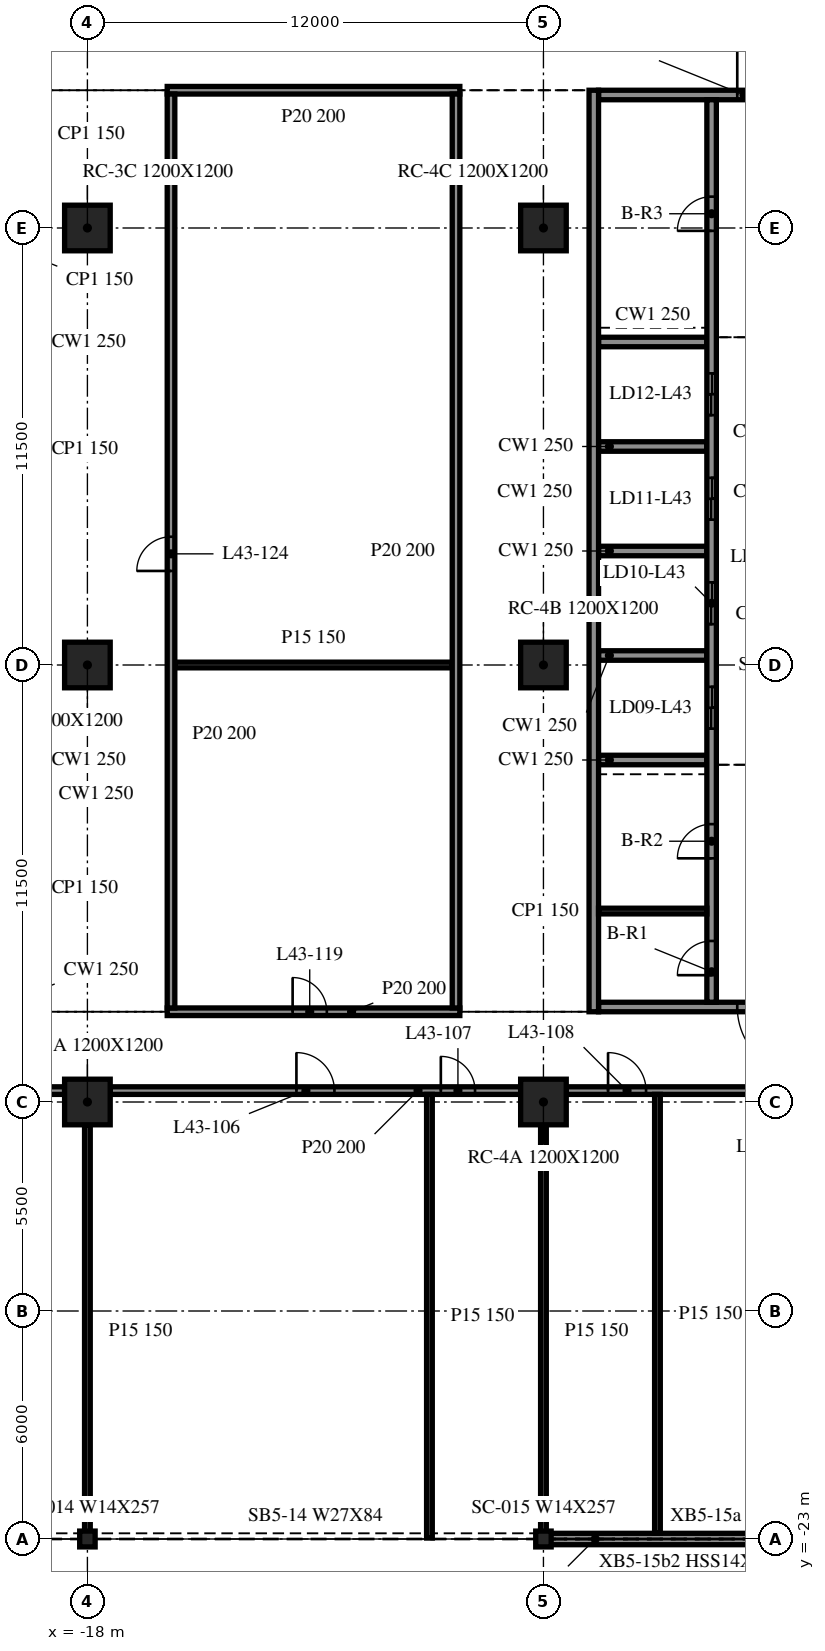
"""IFC4 building model, lengths in metres.
Left out: names, types, materials, properties, quantities, classifications, styles, units other than length and angle.
Written with IfcOpenShell. Run it as: python <this file> out.ifc"""

import sys

from ifc_helpers import new_model, si_unit, direction, frame, frame_2d, origin, origin_2d, place, context, subcontext, project, spatial, rectangle, i_section, extrude, element, fill, save


model = new_model("IFC4")
c1 = context("Model", 3, precision=1e-05, world=origin(), true_north=direction((0.0, 1.0)))
c2 = subcontext(c1, "Body", "Model", "MODEL_VIEW")
j1 = project(units=[si_unit("LENGTHUNIT", "METRE"), si_unit("PLANEANGLEUNIT", "RADIAN")], contexts=[c1])
p1 = place(None, origin())
s1 = spatial("IfcSite", under=j1, at=p1, CompositionType="ELEMENT")
p2 = place(p1, origin())
s2 = spatial("IfcBuilding", under=s1, at=p2, CompositionType="ELEMENT")
p3 = place(p2, frame((0.0, 0.0, 182.0)))
s3 = spatial("IfcBuildingStorey", under=s2, at=p3, CompositionType="ELEMENT", Elevation=182.0)
for number, where, z_axis, x_axis in (
    (1, (-18.0, -11.5, -0.34), (0.0, 0.0, 1.0), (1.0, 0.0, 0.0)),
    (2, (-18.0, 0.0, -0.34), (0.0, 0.0, 1.0), (1.0, 0.0, 0.0)),
    (3, (-18.0, 11.5, -0.34), (0.0, 0.0, 1.0), (1.0, 0.0, 0.0)),
    (4, (-6.0, -11.5, -0.34), (0.0, 0.0, 1.0), (1.0, 0.0, 0.0)),
    (5, (-6.0, 0.0, -0.34), (0.0, 0.0, 1.0), (1.0, 0.0, 0.0)),
    (6, (-6.0, 11.5, -0.34), (0.0, 0.0, 1.0), (1.0, 0.0, 0.0)),
):
    element("IfcColumn", number, at=place(p3, frame(where, z_axis=z_axis, x_axis=x_axis)), inside=s3, PredefinedType="COLUMN", context=c2, shape_type="SweptSolid", body=[
        extrude(rectangle(XDim=1.2, YDim=1.2, at=origin_2d()), origin(), (0.0, 0.0, 1.0), 3.8),
    ])
for number, where, z_axis, x_axis in (
    (7, (-18.0, -23.0, -0.34), (0.0, 0.0, 1.0), (1.0, 0.0, 0.0)),
    (8, (-6.0, -23.0, -0.34), (0.0, 0.0, 1.0), (1.0, 0.0, 0.0)),
):
    element("IfcColumn", number, at=place(p3, frame(where, z_axis=z_axis, x_axis=x_axis)), inside=s3, PredefinedType="COLUMN", context=c2, shape_type="SweptSolid", body=[
        extrude(i_section(OverallWidth=0.406, OverallDepth=0.417, WebThickness=0.03, FlangeThickness=0.048, at=origin_2d()), origin(), (0.0, 0.0, 1.0), 3.8),
    ])
p4 = place(p3, frame((-5.985, -23.0, 0.0), z_axis=(0.0, 0.0, 1.0), x_axis=(1.0, 0.0, 0.0)))
e9 = element("IfcWall", 9, at=p4, inside=s3, PredefinedType="NOTDEFINED", context=c2, shape_type="SweptSolid", body=[
    extrude(rectangle(XDim=11.97, YDim=0.3, at=frame_2d((5.985, 0.0))), origin(), (0.0, 0.0, 1.0), 2.782),
])
p5 = place(p3, frame((-4.675, 15.125, 0.0), z_axis=(0.0, 0.0, 1.0), x_axis=(0.0, -1.0, 0.0)))
e10 = element("IfcWall", 10, at=p5, inside=s3, PredefinedType="SOLIDWALL", context=c2, shape_type="SweptSolid", body=[
    extrude(rectangle(XDim=24.25, YDim=0.25, at=frame_2d((12.125, 0.0))), origin(), (0.0, 0.0, 1.0), 3.46),
])
p6 = place(p3, frame((4.55, -9.0, 0.0), z_axis=(0.0, 0.0, 1.0), x_axis=(-1.0, 0.0, 0.0)))
e11 = element("IfcWall", 11, at=p6, inside=s3, PredefinedType="SOLIDWALL", context=c2, shape_type="SweptSolid", body=[
    extrude(rectangle(XDim=9.1, YDim=0.25, at=frame_2d((4.55, 0.0))), origin(), (0.0, 0.0, 1.0), 3.46),
])
p7 = place(p6, frame((3.65, 0.0, 0.0)))
e12 = element("IfcOpeningElement", 12, at=p7, cuts=e11, PredefinedType="OPENING", context=c2, shape_type="SweptSolid", body=[
    extrude(rectangle(XDim=1.8, YDim=2.1, at=frame_2d((0.9, 1.05))), frame((0.0, 0.135, 0.0), z_axis=(0.0, -1.0, 0.0), x_axis=(1.0, 0.0, 0.0)), (0.0, 0.0, 1.0), 0.27),
])
p8 = place(p3, frame((-4.55, 15.0, 0.0), z_axis=(0.0, 0.0, 1.0), x_axis=(1.0, 0.0, 0.0)))
e13 = element("IfcWall", 13, at=p8, inside=s3, PredefinedType="SOLIDWALL", context=c2, shape_type="SweptSolid", body=[
    extrude(rectangle(XDim=9.1, YDim=0.25, at=frame_2d((4.55, 0.0))), origin(), (0.0, 0.0, 1.0), 3.46),
])
p9 = place(p8, frame((3.65, 0.0, 0.0)))
e14 = element("IfcOpeningElement", 14, at=p9, cuts=e13, PredefinedType="OPENING", context=c2, shape_type="SweptSolid", body=[
    extrude(rectangle(XDim=1.8, YDim=2.1, at=frame_2d((0.9, 1.05))), frame((0.0, 0.135, 0.0), z_axis=(0.0, -1.0, 0.0), x_axis=(1.0, 0.0, 0.0)), (0.0, 0.0, 1.0), 0.27),
])
p10 = place(p3, frame((-1.575, -8.875, 0.0), z_axis=(0.0, 0.0, 1.0), x_axis=(0.0, 1.0, 0.0)))
e15 = element("IfcWall", 15, at=p10, inside=s3, PredefinedType="SOLIDWALL", context=c2, shape_type="SweptSolid", body=[
    extrude(rectangle(XDim=23.75, YDim=0.25, at=frame_2d((11.875, 0.0))), origin(), (0.0, 0.0, 1.0), 3.46),
])
p11 = place(p10, frame((7.2, 0.0, 0.0)))
e16 = element("IfcOpeningElement", 16, at=p11, cuts=e15, PredefinedType="OPENING", context=c2, shape_type="SweptSolid", body=[
    extrude(rectangle(XDim=1.1, YDim=2.1, at=frame_2d((0.55, 1.05))), frame((0.0, 0.135, 0.0), z_axis=(0.0, -1.0, 0.0), x_axis=(1.0, 0.0, 0.0)), (0.0, 0.0, 1.0), 0.27),
])
p12 = place(p10, frame((9.95, 0.0, 0.0)))
e17 = element("IfcOpeningElement", 17, at=p12, cuts=e15, PredefinedType="OPENING", context=c2, shape_type="SweptSolid", body=[
    extrude(rectangle(XDim=1.1, YDim=2.1, at=frame_2d((0.55, 1.05))), frame((0.0, 0.135, 0.0), z_axis=(0.0, -1.0, 0.0), x_axis=(1.0, 0.0, 0.0)), (0.0, 0.0, 1.0), 0.27),
])
p13 = place(p10, frame((12.7, 0.0, 0.0)))
e18 = element("IfcOpeningElement", 18, at=p13, cuts=e15, PredefinedType="OPENING", context=c2, shape_type="SweptSolid", body=[
    extrude(rectangle(XDim=1.1, YDim=2.1, at=frame_2d((0.55, 1.05))), frame((0.0, 0.135, 0.0), z_axis=(0.0, -1.0, 0.0), x_axis=(1.0, 0.0, 0.0)), (0.0, 0.0, 1.0), 0.27),
])
p14 = place(p10, frame((15.45, 0.0, 0.0)))
e19 = element("IfcOpeningElement", 19, at=p14, cuts=e15, PredefinedType="OPENING", context=c2, shape_type="SweptSolid", body=[
    extrude(rectangle(XDim=1.1, YDim=2.1, at=frame_2d((0.55, 1.05))), frame((0.0, 0.135, 0.0), z_axis=(0.0, -1.0, 0.0), x_axis=(1.0, 0.0, 0.0)), (0.0, 0.0, 1.0), 0.27),
])
p15 = place(p10, frame((0.712, 0.0, 0.0)))
e20 = element("IfcOpeningElement", 20, at=p15, cuts=e15, PredefinedType="OPENING", context=c2, shape_type="SweptSolid", body=[
    extrude(rectangle(XDim=0.9, YDim=2.1, at=frame_2d((0.45, 1.05))), frame((0.0, 0.135, 0.0), z_axis=(0.0, -1.0, 0.0), x_axis=(1.0, 0.0, 0.0)), (0.0, 0.0, 1.0), 0.27),
])
p16 = place(p10, frame((3.788, 0.0, 0.0)))
e21 = element("IfcOpeningElement", 21, at=p16, cuts=e15, PredefinedType="OPENING", context=c2, shape_type="SweptSolid", body=[
    extrude(rectangle(XDim=0.9, YDim=2.1, at=frame_2d((0.45, 1.05))), frame((0.0, 0.135, 0.0), z_axis=(0.0, -1.0, 0.0), x_axis=(1.0, 0.0, 0.0)), (0.0, 0.0, 1.0), 0.27),
])
p17 = place(p10, frame((20.3, 0.0, 0.0)))
e22 = element("IfcOpeningElement", 22, at=p17, cuts=e15, PredefinedType="OPENING", context=c2, shape_type="SweptSolid", body=[
    extrude(rectangle(XDim=0.9, YDim=2.1, at=frame_2d((0.45, 1.05))), frame((0.0, 0.135, 0.0), z_axis=(0.0, -1.0, 0.0), x_axis=(1.0, 0.0, 0.0)), (0.0, 0.0, 1.0), 0.27),
])
for number, where, z_axis, x_axis in (
    (23, (-4.55, -2.5, 0.0), (0.0, 0.0, 1.0), (1.0, 0.0, 0.0)),
    (24, (-4.55, 0.25, 0.0), (0.0, 0.0, 1.0), (1.0, 0.0, 0.0)),
    (25, (-4.55, 3.0, 0.0), (0.0, 0.0, 1.0), (1.0, 0.0, 0.0)),
    (26, (-4.55, 5.75, 0.0), (0.0, 0.0, 1.0), (1.0, 0.0, 0.0)),
    (27, (-4.55, 8.5, 0.0), (0.0, 0.0, 1.0), (1.0, 0.0, 0.0)),
):
    element("IfcWall", number, at=place(p3, frame(where, z_axis=z_axis, x_axis=x_axis)), inside=s3, PredefinedType="SOLIDWALL", context=c2, shape_type="SweptSolid", body=[
        extrude(rectangle(XDim=2.85, YDim=0.25, at=frame_2d((1.425, 0.0))), origin(), (0.0, 0.0, 1.0), 3.46),
    ])
p18 = place(p3, frame((-4.55, -6.475, 0.0), z_axis=(0.0, 0.0, 1.0), x_axis=(1.0, 0.0, 0.0)))
e28 = element("IfcWall", 28, at=p18, inside=s3, PredefinedType="PARTITIONING", context=c2, shape_type="SweptSolid", body=[
    extrude(rectangle(XDim=2.85, YDim=0.15, at=frame_2d((1.425, 0.0))), origin(), (0.0, 0.0, 1.0), 3.46),
])
p19 = place(p3, frame((-29.4, -11.2, 0.0), z_axis=(0.0, 0.0, 1.0), x_axis=(1.0, 0.0, 0.0)))
e29 = element("IfcWall", 29, at=p19, inside=s3, PredefinedType="PARTITIONING", context=c2, shape_type="SweptSolid", body=[
    extrude(rectangle(XDim=10.8, YDim=0.2, at=frame_2d((5.4, 0.0))), origin(), (0.0, 0.0, 1.0), 3.46),
])
p20 = place(p19, frame((4.1, 0.0, 0.0)))
e30 = element("IfcOpeningElement", 30, at=p20, cuts=e29, PredefinedType="OPENING", context=c2, shape_type="SweptSolid", body=[
    extrude(rectangle(XDim=1.0, YDim=2.1, at=frame_2d((0.5, 1.05))), frame((0.0, 0.11, 0.0), z_axis=(0.0, -1.0, 0.0), x_axis=(1.0, 0.0, 0.0)), (0.0, 0.0, 1.0), 0.22),
])
p21 = place(p19, frame((5.7, 0.0, 0.0)))
e31 = element("IfcOpeningElement", 31, at=p21, cuts=e29, PredefinedType="OPENING", context=c2, shape_type="SweptSolid", body=[
    extrude(rectangle(XDim=1.0, YDim=2.1, at=frame_2d((0.5, 1.05))), frame((0.0, 0.11, 0.0), z_axis=(0.0, -1.0, 0.0), x_axis=(1.0, 0.0, 0.0)), (0.0, 0.0, 1.0), 0.22),
])
p22 = place(p3, frame((-17.4, -11.2, 0.0), z_axis=(0.0, 0.0, 1.0), x_axis=(1.0, 0.0, 0.0)))
e32 = element("IfcWall", 32, at=p22, inside=s3, PredefinedType="PARTITIONING", context=c2, shape_type="SweptSolid", body=[
    extrude(rectangle(XDim=10.8, YDim=0.2, at=frame_2d((5.4, 0.0))), origin(), (0.0, 0.0, 1.0), 3.46),
])
p23 = place(p22, frame((4.9, 0.0, 0.0)))
e33 = element("IfcOpeningElement", 33, at=p23, cuts=e32, PredefinedType="OPENING", context=c2, shape_type="SweptSolid", body=[
    extrude(rectangle(XDim=1.0, YDim=2.1, at=frame_2d((0.5, 1.05))), frame((0.0, 0.11, 0.0), z_axis=(0.0, -1.0, 0.0), x_axis=(1.0, 0.0, 0.0)), (0.0, 0.0, 1.0), 0.22),
])
p24 = place(p22, frame((8.7, 0.0, 0.0)))
e34 = element("IfcOpeningElement", 34, at=p24, cuts=e32, PredefinedType="OPENING", context=c2, shape_type="SweptSolid", body=[
    extrude(rectangle(XDim=0.9, YDim=2.1, at=frame_2d((0.45, 1.05))), frame((0.0, 0.11, 0.0), z_axis=(0.0, -1.0, 0.0), x_axis=(1.0, 0.0, 0.0)), (0.0, 0.0, 1.0), 0.22),
])
p25 = place(p3, frame((-5.4, -11.2, 0.0), z_axis=(0.0, 0.0, 1.0), x_axis=(1.0, 0.0, 0.0)))
e35 = element("IfcWall", 35, at=p25, inside=s3, PredefinedType="PARTITIONING", context=c2, shape_type="SweptSolid", body=[
    extrude(rectangle(XDim=10.8, YDim=0.2, at=frame_2d((5.4, 0.0))), origin(), (0.0, 0.0, 1.0), 3.46),
])
p26 = place(p25, frame((1.1, 0.0, 0.0)))
e36 = element("IfcOpeningElement", 36, at=p26, cuts=e35, PredefinedType="OPENING", context=c2, shape_type="SweptSolid", body=[
    extrude(rectangle(XDim=1.0, YDim=2.1, at=frame_2d((0.5, 1.05))), frame((0.0, 0.11, 0.0), z_axis=(0.0, -1.0, 0.0), x_axis=(1.0, 0.0, 0.0)), (0.0, 0.0, 1.0), 0.22),
])
p27 = place(p25, frame((4.9, 0.0, 0.0)))
e37 = element("IfcOpeningElement", 37, at=p27, cuts=e35, PredefinedType="OPENING", context=c2, shape_type="SweptSolid", body=[
    extrude(rectangle(XDim=0.9, YDim=2.1, at=frame_2d((0.45, 1.05))), frame((0.0, 0.11, 0.0), z_axis=(0.0, -1.0, 0.0), x_axis=(1.0, 0.0, 0.0)), (0.0, 0.0, 1.0), 0.22),
])
p28 = place(p3, frame((-15.9, -9.125, 0.0), z_axis=(0.0, 0.0, 1.0), x_axis=(1.0, 0.0, 0.0)))
e38 = element("IfcWall", 38, at=p28, inside=s3, PredefinedType="PARTITIONING", context=c2, shape_type="SweptSolid", body=[
    extrude(rectangle(XDim=7.7, YDim=0.2, at=frame_2d((3.85, 0.0))), origin(), (0.0, 0.0, 1.0), 3.46),
])
p29 = place(p28, frame((3.3, 0.0, 0.0)))
e39 = element("IfcOpeningElement", 39, at=p29, cuts=e38, PredefinedType="OPENING", context=c2, shape_type="SweptSolid", body=[
    extrude(rectangle(XDim=0.9, YDim=2.1, at=frame_2d((0.45, 1.05))), frame((0.0, 0.11, 0.0), z_axis=(0.0, -1.0, 0.0), x_axis=(1.0, 0.0, 0.0)), (0.0, 0.0, 1.0), 0.22),
])
p30 = place(p3, frame((-15.7, 0.0, 0.0), z_axis=(0.0, 0.0, 1.0), x_axis=(1.0, 0.0, 0.0)))
e40 = element("IfcWall", 40, at=p30, inside=s3, PredefinedType="PARTITIONING", context=c2, shape_type="SweptSolid", body=[
    extrude(rectangle(XDim=7.3, YDim=0.15, at=frame_2d((3.65, 0.0))), origin(), (0.0, 0.0, 1.0), 3.46),
])
p31 = place(p3, frame((-15.9, 15.125, 0.0), z_axis=(0.0, 0.0, 1.0), x_axis=(1.0, 0.0, 0.0)))
e41 = element("IfcWall", 41, at=p31, inside=s3, PredefinedType="PARTITIONING", context=c2, shape_type="SweptSolid", body=[
    extrude(rectangle(XDim=7.7, YDim=0.2, at=frame_2d((3.85, 0.0))), origin(), (0.0, 0.0, 1.0), 3.46),
])
p32 = place(p3, frame((-18.0, -22.975, 0.0), z_axis=(0.0, 0.0, 1.0), x_axis=(0.0, 1.0, 0.0)))
e42 = element("IfcWall", 42, at=p32, inside=s3, PredefinedType="PARTITIONING", context=c2, shape_type="SweptSolid", body=[
    extrude(rectangle(XDim=10.875, YDim=0.15, at=frame_2d((5.438, 0.0))), origin(), (0.0, 0.0, 1.0), 3.46),
])
p33 = place(p3, frame((-15.8, -9.025, 0.0), z_axis=(0.0, 0.0, 1.0), x_axis=(0.0, 1.0, 0.0)))
e43 = element("IfcWall", 43, at=p33, inside=s3, PredefinedType="PARTITIONING", context=c2, shape_type="SweptSolid", body=[
    extrude(rectangle(XDim=24.05, YDim=0.2, at=frame_2d((12.025, 0.0))), origin(), (0.0, 0.0, 1.0), 3.46),
])
p34 = place(p33, frame((11.5, 0.0, 0.0)))
e44 = element("IfcOpeningElement", 44, at=p34, cuts=e43, PredefinedType="OPENING", context=c2, shape_type="SweptSolid", body=[
    extrude(rectangle(XDim=0.9, YDim=2.1, at=frame_2d((0.45, 1.05))), frame((0.0, 0.11, 0.0), z_axis=(0.0, -1.0, 0.0), x_axis=(1.0, 0.0, 0.0)), (0.0, 0.0, 1.0), 0.22),
])
p35 = place(p3, frame((-9.0, -22.975, 0.0), z_axis=(0.0, 0.0, 1.0), x_axis=(0.0, 1.0, 0.0)))
e45 = element("IfcWall", 45, at=p35, inside=s3, PredefinedType="PARTITIONING", context=c2, shape_type="SweptSolid", body=[
    extrude(rectangle(XDim=11.675, YDim=0.15, at=frame_2d((5.837, 0.0))), origin(), (0.0, 0.0, 1.0), 3.46),
])
p36 = place(p3, frame((-8.3, -9.025, 0.0), z_axis=(0.0, 0.0, 1.0), x_axis=(0.0, 1.0, 0.0)))
e46 = element("IfcWall", 46, at=p36, inside=s3, PredefinedType="PARTITIONING", context=c2, shape_type="SweptSolid", body=[
    extrude(rectangle(XDim=24.05, YDim=0.2, at=frame_2d((12.025, 0.0))), origin(), (0.0, 0.0, 1.0), 3.46),
])
p37 = place(p3, frame((-6.0, -22.975, 0.0), z_axis=(0.0, 0.0, 1.0), x_axis=(0.0, 1.0, 0.0)))
e47 = element("IfcWall", 47, at=p37, inside=s3, PredefinedType="PARTITIONING", context=c2, shape_type="SweptSolid", body=[
    extrude(rectangle(XDim=10.875, YDim=0.15, at=frame_2d((5.438, 0.0))), origin(), (0.0, 0.0, 1.0), 3.46),
])
p38 = place(p3, frame((-3.0, -22.85, 0.0), z_axis=(0.0, 0.0, 1.0), x_axis=(0.0, 1.0, 0.0)))
e48 = element("IfcWall", 48, at=p38, inside=s3, PredefinedType="PARTITIONING", context=c2, shape_type="SweptSolid", body=[
    extrude(rectangle(XDim=11.55, YDim=0.15, at=frame_2d((5.775, 0.0))), origin(), (0.0, 0.0, 1.0), 3.46),
])
p39 = place(p7, origin())
e49 = element("IfcDoor", 49, at=p39, inside=s3, OperationType="DOUBLE_DOOR_SINGLE_SWING", PredefinedType="DOOR", context=c2, shape_type="SweptSolid", body=[
    extrude(rectangle(XDim=1.8, YDim=2.1, at=frame_2d((0.9, 1.05))), frame((0.0, 0.025, 0.0), z_axis=(0.0, -1.0, 0.0), x_axis=(1.0, 0.0, 0.0)), (0.0, 0.0, 1.0), 0.05),
])
fill(e12, e49)
p40 = place(p9, origin())
e50 = element("IfcDoor", 50, at=p40, inside=s3, OperationType="DOUBLE_DOOR_SINGLE_SWING", PredefinedType="DOOR", context=c2, shape_type="SweptSolid", body=[
    extrude(rectangle(XDim=1.8, YDim=2.1, at=frame_2d((0.9, 1.05))), frame((0.0, 0.025, 0.0), z_axis=(0.0, -1.0, 0.0), x_axis=(1.0, 0.0, 0.0)), (0.0, 0.0, 1.0), 0.05),
])
fill(e14, e50)
p41 = place(p11, origin())
e51 = element("IfcDoor", 51, at=p41, inside=s3, OperationType="DOUBLE_DOOR_SLIDING", PredefinedType="DOOR", context=c2, shape_type="SweptSolid", body=[
    extrude(rectangle(XDim=1.1, YDim=2.1, at=frame_2d((0.55, 1.05))), frame((0.0, 0.025, 0.0), z_axis=(0.0, -1.0, 0.0), x_axis=(1.0, 0.0, 0.0)), (0.0, 0.0, 1.0), 0.05),
])
fill(e16, e51)
p42 = place(p12, origin())
e52 = element("IfcDoor", 52, at=p42, inside=s3, OperationType="DOUBLE_DOOR_SLIDING", PredefinedType="DOOR", context=c2, shape_type="SweptSolid", body=[
    extrude(rectangle(XDim=1.1, YDim=2.1, at=frame_2d((0.55, 1.05))), frame((0.0, 0.025, 0.0), z_axis=(0.0, -1.0, 0.0), x_axis=(1.0, 0.0, 0.0)), (0.0, 0.0, 1.0), 0.05),
])
fill(e17, e52)
p43 = place(p13, origin())
e53 = element("IfcDoor", 53, at=p43, inside=s3, OperationType="DOUBLE_DOOR_SLIDING", PredefinedType="DOOR", context=c2, shape_type="SweptSolid", body=[
    extrude(rectangle(XDim=1.1, YDim=2.1, at=frame_2d((0.55, 1.05))), frame((0.0, 0.025, 0.0), z_axis=(0.0, -1.0, 0.0), x_axis=(1.0, 0.0, 0.0)), (0.0, 0.0, 1.0), 0.05),
])
fill(e18, e53)
p44 = place(p14, origin())
e54 = element("IfcDoor", 54, at=p44, inside=s3, OperationType="DOUBLE_DOOR_SLIDING", PredefinedType="DOOR", context=c2, shape_type="SweptSolid", body=[
    extrude(rectangle(XDim=1.1, YDim=2.1, at=frame_2d((0.55, 1.05))), frame((0.0, 0.025, 0.0), z_axis=(0.0, -1.0, 0.0), x_axis=(1.0, 0.0, 0.0)), (0.0, 0.0, 1.0), 0.05),
])
fill(e19, e54)
p45 = place(p15, origin())
e55 = element("IfcDoor", 55, at=p45, inside=s3, OperationType="SINGLE_SWING_LEFT", PredefinedType="DOOR", context=c2, shape_type="SweptSolid", body=[
    extrude(rectangle(XDim=0.9, YDim=2.1, at=frame_2d((0.45, 1.05))), frame((0.0, 0.025, 0.0), z_axis=(0.0, -1.0, 0.0), x_axis=(1.0, 0.0, 0.0)), (0.0, 0.0, 1.0), 0.05),
])
fill(e20, e55)
p46 = place(p16, origin())
e56 = element("IfcDoor", 56, at=p46, inside=s3, OperationType="SINGLE_SWING_RIGHT", PredefinedType="DOOR", context=c2, shape_type="SweptSolid", body=[
    extrude(rectangle(XDim=0.9, YDim=2.1, at=frame_2d((0.45, 1.05))), frame((0.0, 0.025, 0.0), z_axis=(0.0, -1.0, 0.0), x_axis=(1.0, 0.0, 0.0)), (0.0, 0.0, 1.0), 0.05),
])
fill(e21, e56)
p47 = place(p17, origin())
e57 = element("IfcDoor", 57, at=p47, inside=s3, OperationType="SINGLE_SWING_LEFT", PredefinedType="DOOR", context=c2, shape_type="SweptSolid", body=[
    extrude(rectangle(XDim=0.9, YDim=2.1, at=frame_2d((0.45, 1.05))), frame((0.0, 0.025, 0.0), z_axis=(0.0, -1.0, 0.0), x_axis=(1.0, 0.0, 0.0)), (0.0, 0.0, 1.0), 0.05),
])
fill(e22, e57)
p48 = place(p23, origin())
e58 = element("IfcDoor", 58, at=p48, inside=s3, OperationType="SINGLE_SWING_LEFT", PredefinedType="DOOR", context=c2, shape_type="SweptSolid", body=[
    extrude(rectangle(XDim=1.0, YDim=2.1, at=frame_2d((0.5, 1.05))), frame((0.0, 0.025, 0.0), z_axis=(0.0, -1.0, 0.0), x_axis=(1.0, 0.0, 0.0)), (0.0, 0.0, 1.0), 0.05),
])
fill(e33, e58)
p49 = place(p24, origin())
e59 = element("IfcDoor", 59, at=p49, inside=s3, OperationType="SINGLE_SWING_LEFT", PredefinedType="DOOR", context=c2, shape_type="SweptSolid", body=[
    extrude(rectangle(XDim=0.9, YDim=2.1, at=frame_2d((0.45, 1.05))), frame((0.0, 0.025, 0.0), z_axis=(0.0, -1.0, 0.0), x_axis=(1.0, 0.0, 0.0)), (0.0, 0.0, 1.0), 0.05),
])
fill(e34, e59)
p50 = place(p26, origin())
e60 = element("IfcDoor", 60, at=p50, inside=s3, OperationType="SINGLE_SWING_RIGHT", PredefinedType="DOOR", context=c2, shape_type="SweptSolid", body=[
    extrude(rectangle(XDim=1.0, YDim=2.1, at=frame_2d((0.5, 1.05))), frame((0.0, 0.025, 0.0), z_axis=(0.0, -1.0, 0.0), x_axis=(1.0, 0.0, 0.0)), (0.0, 0.0, 1.0), 0.05),
])
fill(e36, e60)
p51 = place(p29, origin())
e61 = element("IfcDoor", 61, at=p51, inside=s3, OperationType="SINGLE_SWING_LEFT", PredefinedType="DOOR", context=c2, shape_type="SweptSolid", body=[
    extrude(rectangle(XDim=0.9, YDim=2.1, at=frame_2d((0.45, 1.05))), frame((0.0, 0.025, 0.0), z_axis=(0.0, -1.0, 0.0), x_axis=(1.0, 0.0, 0.0)), (0.0, 0.0, 1.0), 0.05),
])
fill(e39, e61)
p52 = place(p34, origin())
e62 = element("IfcDoor", 62, at=p52, inside=s3, OperationType="SINGLE_SWING_RIGHT", PredefinedType="DOOR", context=c2, shape_type="SweptSolid", body=[
    extrude(rectangle(XDim=0.9, YDim=2.1, at=frame_2d((0.45, 1.05))), frame((0.0, 0.025, 0.0), z_axis=(0.0, -1.0, 0.0), x_axis=(1.0, 0.0, 0.0)), (0.0, 0.0, 1.0), 0.05),
])
fill(e44, e62)
save(model, sys.argv[1])
